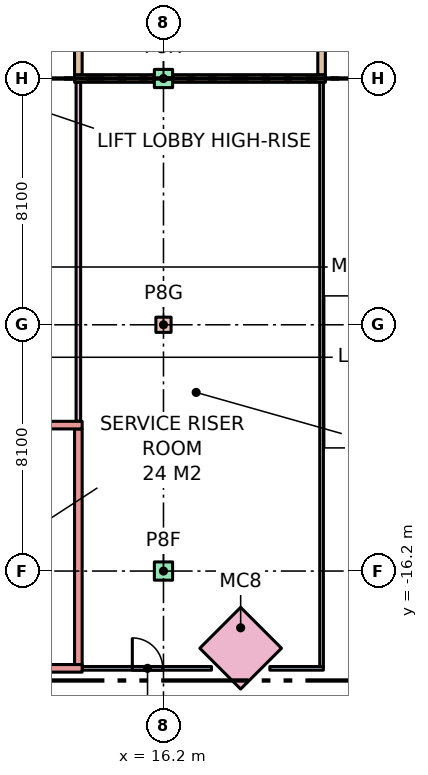
"""IFC4 building model, lengths in metres.
Left out: names, types, materials, properties, quantities, classifications, styles, units other than length and angle.
Written with IfcOpenShell. Run it as: python <this file> out.ifc"""

import sys

from ifc_helpers import new_model, si_unit, direction, frame, frame_2d, origin, origin_2d, place, context, subcontext, project, spatial, rectangle, extrude, element, fill, save


model = new_model("IFC4")
c1 = context("Model", 3, precision=1e-05, world=origin(), true_north=direction((0.0, 1.0)))
c2 = subcontext(c1, "Body", "Model", "MODEL_VIEW")
j1 = project(units=[si_unit("LENGTHUNIT", "METRE"), si_unit("PLANEANGLEUNIT", "RADIAN")], contexts=[c1])
p1 = place(None, origin())
s1 = spatial("IfcSite", under=j1, at=p1, CompositionType="ELEMENT")
p2 = place(p1, origin())
s2 = spatial("IfcBuilding", under=s1, at=p2, CompositionType="ELEMENT")
p3 = place(p2, frame((0.0, 0.0, -3.6)))
s3 = spatial("IfcBuildingStorey", under=s2, at=p3, CompositionType="ELEMENT", Elevation=-3.6)
p4 = place(p3, frame((16.2, -16.2, 0.0), z_axis=(0.0, 0.0, 1.0), x_axis=(1.0, 0.0, 0.0)))
e1 = element("IfcColumn", 1, at=p4, inside=s3, PredefinedType="COLUMN", context=c2, shape_type="SweptSolid", body=[
    extrude(rectangle(XDim=0.6, YDim=0.6, at=origin_2d()), origin(), (0.0, 0.0, 1.0), 3.6),
])
p5 = place(p3, frame((16.2, -8.1, 0.0), z_axis=(0.0, 0.0, 1.0), x_axis=(1.0, 0.0, 0.0)))
e2 = element("IfcColumn", 2, at=p5, inside=s3, PredefinedType="COLUMN", context=c2, shape_type="SweptSolid", body=[
    extrude(rectangle(XDim=0.5, YDim=0.5, at=origin_2d()), origin(), (0.0, 0.0, 1.0), 3.6),
])
p6 = place(p3, frame((16.2, 0.0, 0.0), z_axis=(0.0, 0.0, 1.0), x_axis=(1.0, 0.0, 0.0)))
e3 = element("IfcColumn", 3, at=p6, inside=s3, PredefinedType="COLUMN", context=c2, shape_type="SweptSolid", body=[
    extrude(rectangle(XDim=0.6, YDim=0.6, at=origin_2d()), origin(), (0.0, 0.0, 1.0), 3.6),
])
p7 = place(p3, frame((18.738, -18.738, 0.0), z_axis=(0.0, 0.0, 1.0), x_axis=(0.707106781187, 0.707106781187, 0.0)))
e4 = element("IfcColumn", 4, at=p7, inside=s3, PredefinedType="COLUMN", context=c2, shape_type="SweptSolid", body=[
    extrude(rectangle(XDim=1.9, YDim=1.9, at=origin_2d()), origin(), (0.0, 0.0, 1.0), 3.6),
])
p8 = place(p3, frame((13.275, 0.0, 0.0), z_axis=(0.0, 0.0, 1.0), x_axis=(1.0, 0.0, 0.0)))
e5 = element("IfcWall", 5, at=p8, inside=s3, PredefinedType="PARTITIONING", context=c2, shape_type="SweptSolid", body=[
    extrude(rectangle(XDim=2.615, YDim=0.25, at=frame_2d((1.308, 0.0))), origin(), (0.0, 0.0, 1.0), 3.15),
])
p9 = place(p3, frame((16.51, 0.0, 0.0), z_axis=(0.0, 0.0, 1.0), x_axis=(1.0, 0.0, 0.0)))
e6 = element("IfcWall", 6, at=p9, inside=s3, PredefinedType="PARTITIONING", context=c2, shape_type="SweptSolid", body=[
    extrude(rectangle(XDim=5.015, YDim=0.25, at=frame_2d((2.507, 0.0))), origin(), (0.0, 0.0, 1.0), 3.15),
])
p10 = place(p3, frame((13.525, -19.4, 0.0), z_axis=(0.0, 0.0, 1.0), x_axis=(1.0, 0.0, 0.0)))
e7 = element("IfcWall", 7, at=p10, inside=s3, PredefinedType="PARTITIONING", context=c2, shape_type="SweptSolid", body=[
    extrude(rectangle(XDim=4.253, YDim=0.12, at=frame_2d((2.127, 0.0))), origin(), (0.0, 0.0, 1.0), 3.15),
])
p11 = place(p10, frame((1.65, 0.0, 0.0)))
e8 = element("IfcOpeningElement", 8, at=p11, cuts=e7, PredefinedType="OPENING", context=c2, shape_type="SweptSolid", body=[
    extrude(rectangle(XDim=1.0, YDim=2.1, at=frame_2d((0.5, 1.05))), frame((0.0, 0.07, 0.0), z_axis=(0.0, -1.0, 0.0), x_axis=(1.0, 0.0, 0.0)), (0.0, 0.0, 1.0), 0.14),
])
p12 = place(p3, frame((19.698, -19.4, 0.0), z_axis=(0.0, 0.0, 1.0), x_axis=(1.0, 0.0, 0.0)))
e9 = element("IfcWall", 9, at=p12, inside=s3, PredefinedType="PARTITIONING", context=c2, shape_type="SweptSolid", body=[
    extrude(rectangle(XDim=1.762, YDim=0.12, at=frame_2d((0.881, 0.0))), origin(), (0.0, 0.0, 1.0), 3.15),
])
p13 = place(p3, frame((21.4, -19.34, 0.0), z_axis=(0.0, 0.0, 1.0), x_axis=(0.0, 1.0, 0.0)))
e10 = element("IfcWall", 10, at=p13, inside=s3, PredefinedType="PARTITIONING", context=c2, shape_type="SweptSolid", body=[
    extrude(rectangle(XDim=19.215, YDim=0.12, at=frame_2d((9.607, 0.0))), origin(), (0.0, 0.0, 1.0), 3.15),
])
p14 = place(p3, frame((13.4, -11.275, 0.0), z_axis=(0.0, 0.0, 1.0), x_axis=(0.0, 1.0, 0.0)))
e11 = element("IfcWall", 11, at=p14, inside=s3, PredefinedType="PARTITIONING", context=c2, shape_type="SweptSolid", body=[
    extrude(rectangle(XDim=11.15, YDim=0.15, at=frame_2d((5.575, 0.0))), origin(), (0.0, 0.0, 1.0), 3.15),
])
p15 = place(p3, frame((13.4, -19.275, 0.0), z_axis=(0.0, 0.0, 1.0), x_axis=(0.0, 1.0, 0.0)))
e12 = element("IfcWall", 12, at=p15, inside=s3, PredefinedType="PARTITIONING", context=c2, shape_type="SweptSolid", body=[
    extrude(rectangle(XDim=7.75, YDim=0.25, at=frame_2d((3.875, 0.0))), origin(), (0.0, 0.0, 1.0), 3.15),
])
p16 = place(p3, frame((21.4, 0.125, 0.0), z_axis=(0.0, 0.0, 1.0), x_axis=(0.0, 1.0, 0.0)))
e13 = element("IfcWall", 13, at=p16, inside=s3, PredefinedType="PARTITIONING", context=c2, shape_type="SweptSolid", body=[
    extrude(rectangle(XDim=19.15, YDim=0.25, at=frame_2d((9.575, 0.0))), origin(), (0.0, 0.0, 1.0), 3.15),
])
p17 = place(p16, frame((9.05, 0.0, 0.0)))
e14 = element("IfcOpeningElement", 14, at=p17, cuts=e13, PredefinedType="OPENING", context=c2, shape_type="SweptSolid", body=[
    extrude(rectangle(XDim=1.1, YDim=2.1, at=frame_2d((0.55, 1.05))), frame((0.0, 0.135, 0.0), z_axis=(0.0, -1.0, 0.0), x_axis=(1.0, 0.0, 0.0)), (0.0, 0.0, 1.0), 0.27),
])
p18 = place(p3, frame((13.4, 0.125, 0.0), z_axis=(0.0, 0.0, 1.0), x_axis=(0.0, 1.0, 0.0)))
e15 = element("IfcWall", 15, at=p18, inside=s3, PredefinedType="PARTITIONING", context=c2, shape_type="SweptSolid", body=[
    extrude(rectangle(XDim=19.15, YDim=0.25, at=frame_2d((9.575, 0.0))), origin(), (0.0, 0.0, 1.0), 3.15),
])
p19 = place(p3, frame((10.175, -19.4, 0.0), z_axis=(0.0, 0.0, 1.0), x_axis=(1.0, 0.0, 0.0)))
e16 = element("IfcWall", 16, at=p19, inside=s3, PredefinedType="PARTITIONING", context=c2, shape_type="SweptSolid", body=[
    extrude(rectangle(XDim=3.35, YDim=0.25, at=frame_2d((1.675, 0.0))), origin(), (0.0, 0.0, 1.0), 3.15),
])
p20 = place(p19, frame((1.15, 0.0, 0.0)))
e17 = element("IfcOpeningElement", 17, at=p20, cuts=e16, PredefinedType="OPENING", context=c2, shape_type="SweptSolid", body=[
    extrude(rectangle(XDim=1.0, YDim=2.1, at=frame_2d((0.5, 1.05))), frame((0.0, 0.135, 0.0), z_axis=(0.0, -1.0, 0.0), x_axis=(1.0, 0.0, 0.0)), (0.0, 0.0, 1.0), 0.27),
])
p21 = place(p3, frame((10.175, -11.4, 0.0), z_axis=(0.0, 0.0, 1.0), x_axis=(1.0, 0.0, 0.0)))
e18 = element("IfcWall", 18, at=p21, inside=s3, PredefinedType="PARTITIONING", context=c2, shape_type="SweptSolid", body=[
    extrude(rectangle(XDim=3.35, YDim=0.25, at=frame_2d((1.675, 0.0))), origin(), (0.0, 0.0, 1.0), 3.15),
])
p22 = place(p11, origin())
e19 = element("IfcDoor", 19, at=p22, inside=s3, OperationType="SINGLE_SWING_LEFT", PredefinedType="DOOR", context=c2, shape_type="SweptSolid", body=[
    extrude(rectangle(XDim=1.0, YDim=2.1, at=frame_2d((0.5, 1.05))), frame((0.0, 0.025, 0.0), z_axis=(0.0, -1.0, 0.0), x_axis=(1.0, 0.0, 0.0)), (0.0, 0.0, 1.0), 0.05),
])
fill(e8, e19)
save(model, sys.argv[1])
